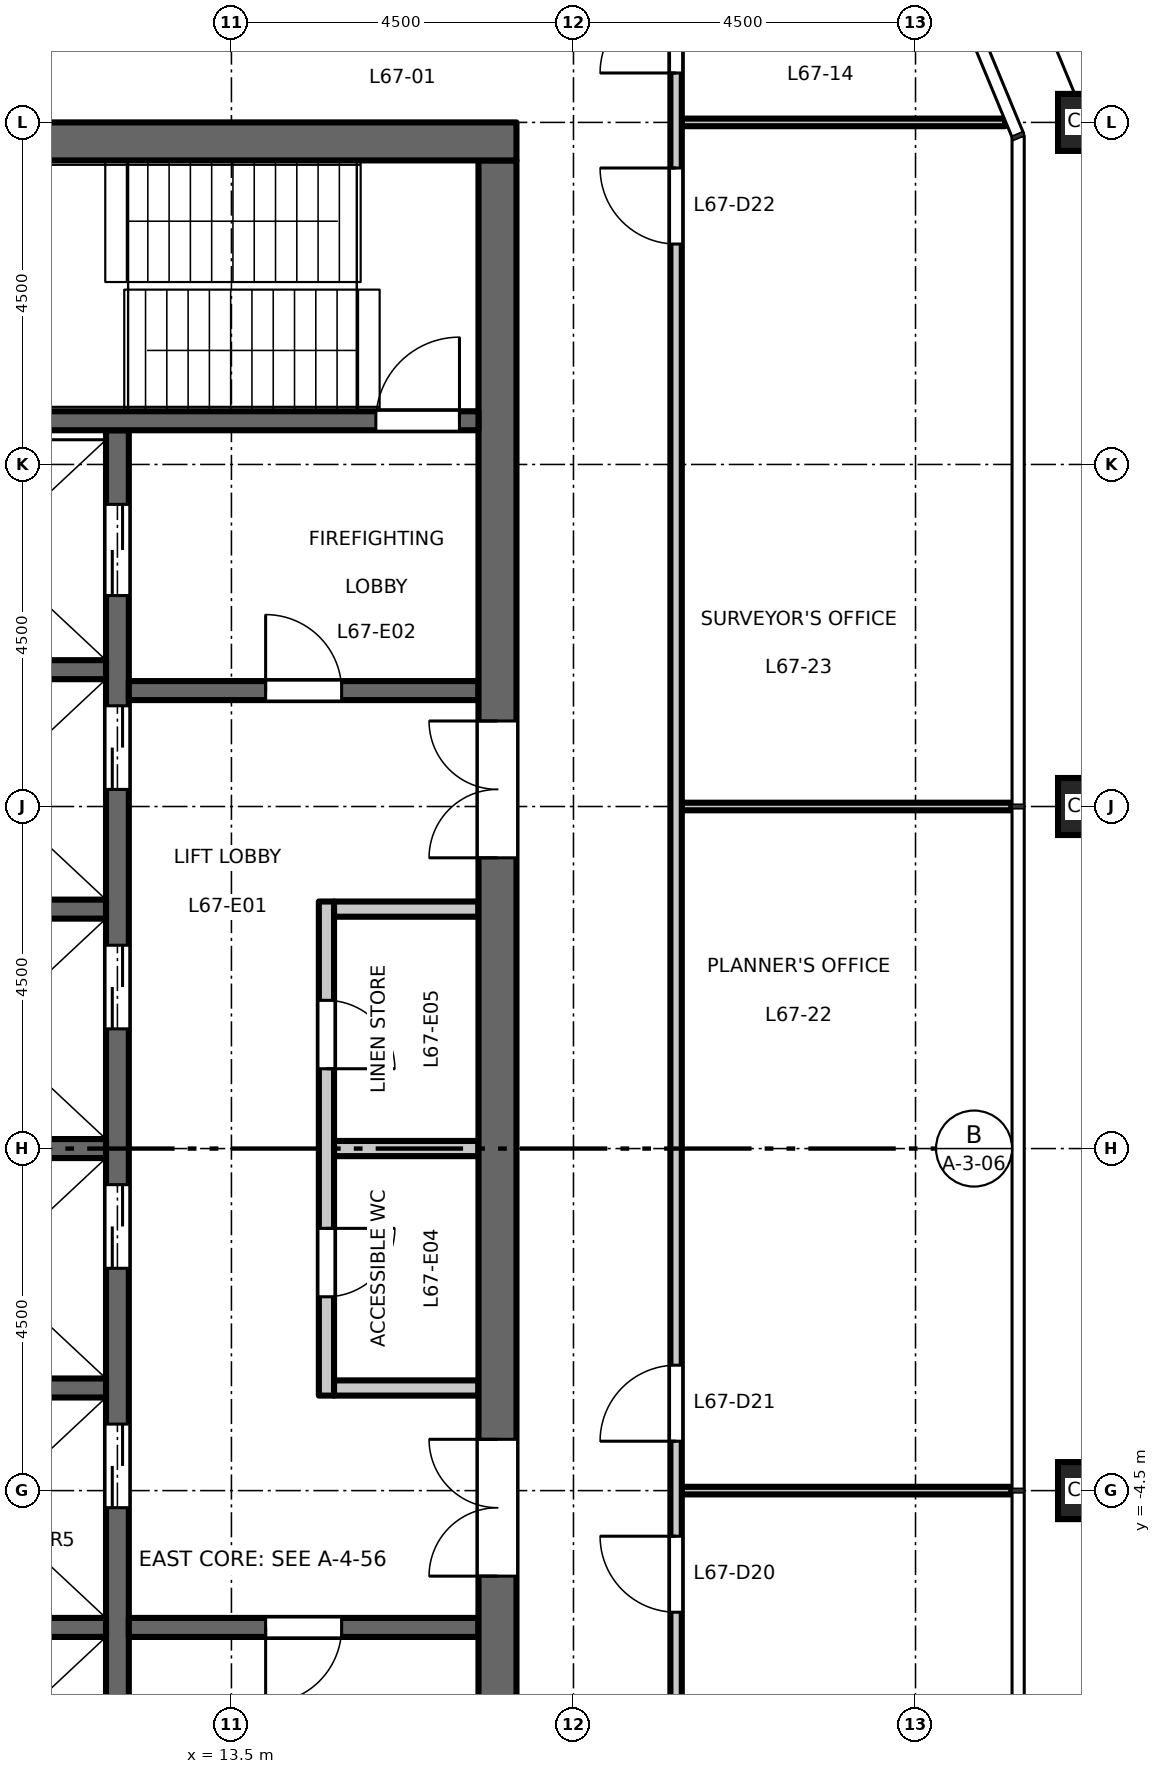
"""IFC4 building model, lengths in metres.
Left out: names, types, materials, properties, quantities, classifications, styles, units other than length and angle.
Written with IfcOpenShell. Run it as: python <this file> out.ifc"""

import sys

from ifc_helpers import new_model, si_unit, direction, frame, frame_2d, origin, origin_2d, place, context, subcontext, project, spatial, rectangle, hollow_rectangle, extrude, element, fill, save


model = new_model("IFC4")
c1 = context("Model", 3, precision=1e-05, world=origin(), true_north=direction((0.0, 1.0)))
c2 = subcontext(c1, "Body", "Model", "MODEL_VIEW")
j1 = project(units=[si_unit("LENGTHUNIT", "METRE"), si_unit("PLANEANGLEUNIT", "RADIAN")], contexts=[c1])
p1 = place(None, origin())
s1 = spatial("IfcSite", under=j1, at=p1, CompositionType="ELEMENT")
p2 = place(p1, origin())
s2 = spatial("IfcBuilding", under=s1, at=p2, CompositionType="ELEMENT")
p3 = place(p2, frame((0.0, 0.0, 312.2)))
s3 = spatial("IfcBuildingStorey", under=s2, at=p3, CompositionType="ELEMENT", Elevation=312.2)
for number, where, z_axis, x_axis in (
    (1, (24.75, -4.5, 0.0), (0.0, 0.0, 1.0), (1.0, 0.0, 0.0)),
    (2, (24.75, 4.5, 0.0), (0.0, 0.0, 1.0), (1.0, 0.0, 0.0)),
    (3, (24.75, 13.5, 0.0), (0.0, 0.0, 1.0), (1.0, 0.0, 0.0)),
):
    element("IfcColumn", number, at=place(p3, frame(where, z_axis=z_axis, x_axis=x_axis)), inside=s3, PredefinedType="COLUMN", context=c2, shape_type="SweptSolid", body=[
        extrude(hollow_rectangle(XDim=0.75, YDim=0.75, WallThickness=0.04, at=origin_2d()), origin(), (0.0, 0.0, 1.0), 4.5),
    ])
p4 = place(p3, frame((14.75, -3.25, 0.0), z_axis=(0.0, 0.0, 1.0), x_axis=(0.0, 1.0, 0.0)))
e4 = element("IfcWall", 4, at=p4, inside=s3, PredefinedType="PARTITIONING", context=c2, shape_type="SweptSolid", body=[
    extrude(rectangle(XDim=6.5, YDim=0.2, at=frame_2d((3.25, 0.0))), origin(), (0.0, 0.0, 1.0), 4.35),
])
p5 = place(p4, frame((1.3, 0.0, 0.0)))
e5 = element("IfcOpeningElement", 5, at=p5, cuts=e4, PredefinedType="OPENING", context=c2, shape_type="SweptSolid", body=[
    extrude(rectangle(XDim=0.9, YDim=2.1, at=frame_2d((0.45, 1.05))), frame((0.0, 0.11, 0.0), z_axis=(0.0, -1.0, 0.0), x_axis=(1.0, 0.0, 0.0)), (0.0, 0.0, 1.0), 0.22),
])
p6 = place(p4, frame((4.3, 0.0, 0.0)))
e6 = element("IfcOpeningElement", 6, at=p6, cuts=e4, PredefinedType="OPENING", context=c2, shape_type="SweptSolid", body=[
    extrude(rectangle(XDim=0.9, YDim=2.1, at=frame_2d((0.45, 1.05))), frame((0.0, 0.11, 0.0), z_axis=(0.0, -1.0, 0.0), x_axis=(1.0, 0.0, 0.0)), (0.0, 0.0, 1.0), 0.22),
])
for number, where, z_axis, x_axis in (
    (7, (14.85, 3.15, 0.0), (0.0, 0.0, 1.0), (1.0, 0.0, 0.0)),
    (8, (14.85, -3.15, 0.0), (0.0, 0.0, 1.0), (1.0, 0.0, 0.0)),
    (9, (14.85, 0.0, 0.0), (0.0, 0.0, 1.0), (1.0, 0.0, 0.0)),
):
    element("IfcWall", number, at=place(p3, frame(where, z_axis=z_axis, x_axis=x_axis)), inside=s3, PredefinedType="PARTITIONING", context=c2, shape_type="SweptSolid", body=[
        extrude(rectangle(XDim=1.9, YDim=0.2, at=frame_2d((0.95, 0.0))), origin(), (0.0, 0.0, 1.0), 4.35),
    ])
p7 = place(p3, frame((12.0, -9.45, 0.0), z_axis=(0.0, 0.0, 1.0), x_axis=(0.0, 1.0, 0.0)))
e10 = element("IfcWall", 10, at=p7, inside=s3, PredefinedType="SHEAR", context=c2, shape_type="SweptSolid", body=[
    extrude(rectangle(XDim=18.9, YDim=0.3, at=frame_2d((9.45, 0.0))), origin(), (0.0, 0.0, 1.0), 4.35),
])
p8 = place(p7, frame((4.725, 0.0, 0.0)))
e11 = element("IfcOpeningElement", 11, at=p8, cuts=e10, PredefinedType="OPENING", context=c2, shape_type="SweptSolid", body=[
    extrude(rectangle(XDim=1.1, YDim=2.1, at=frame_2d((0.55, 1.05))), frame((0.0, 0.16, 0.0), z_axis=(0.0, -1.0, 0.0), x_axis=(1.0, 0.0, 0.0)), (0.0, 0.0, 1.0), 0.32),
])
p9 = place(p7, frame((7.875, 0.0, 0.0)))
e12 = element("IfcOpeningElement", 12, at=p9, cuts=e10, PredefinedType="OPENING", context=c2, shape_type="SweptSolid", body=[
    extrude(rectangle(XDim=1.1, YDim=2.1, at=frame_2d((0.55, 1.05))), frame((0.0, 0.16, 0.0), z_axis=(0.0, -1.0, 0.0), x_axis=(1.0, 0.0, 0.0)), (0.0, 0.0, 1.0), 0.32),
])
p10 = place(p7, frame((11.025, 0.0, 0.0)))
e13 = element("IfcOpeningElement", 13, at=p10, cuts=e10, PredefinedType="OPENING", context=c2, shape_type="SweptSolid", body=[
    extrude(rectangle(XDim=1.1, YDim=2.1, at=frame_2d((0.55, 1.05))), frame((0.0, 0.16, 0.0), z_axis=(0.0, -1.0, 0.0), x_axis=(1.0, 0.0, 0.0)), (0.0, 0.0, 1.0), 0.32),
])
p11 = place(p7, frame((14.175, 0.0, 0.0)))
e14 = element("IfcOpeningElement", 14, at=p11, cuts=e10, PredefinedType="OPENING", context=c2, shape_type="SweptSolid", body=[
    extrude(rectangle(XDim=1.1, YDim=2.1, at=frame_2d((0.55, 1.05))), frame((0.0, 0.16, 0.0), z_axis=(0.0, -1.0, 0.0), x_axis=(1.0, 0.0, 0.0)), (0.0, 0.0, 1.0), 0.32),
])
p12 = place(p7, frame((16.725, 0.0, 0.0)))
e15 = element("IfcOpeningElement", 15, at=p12, cuts=e10, PredefinedType="OPENING", context=c2, shape_type="SweptSolid", body=[
    extrude(rectangle(XDim=1.2, YDim=2.1, at=frame_2d((0.6, 1.05))), frame((0.0, 0.16, 0.0), z_axis=(0.0, -1.0, 0.0), x_axis=(1.0, 0.0, 0.0)), (0.0, 0.0, 1.0), 0.32),
])
p13 = place(p7, frame((0.975, 0.0, 0.0)))
e16 = element("IfcOpeningElement", 16, at=p13, cuts=e10, PredefinedType="OPENING", context=c2, shape_type="SweptSolid", body=[
    extrude(rectangle(XDim=1.2, YDim=2.1, at=frame_2d((0.6, 1.05))), frame((0.0, 0.16, 0.0), z_axis=(0.0, -1.0, 0.0), x_axis=(1.0, 0.0, 0.0)), (0.0, 0.0, 1.0), 0.32),
])
p14 = place(p3, frame((12.15, 6.025, 0.0), z_axis=(0.0, 0.0, 1.0), x_axis=(1.0, 0.0, 0.0)))
e17 = element("IfcWall", 17, at=p14, inside=s3, PredefinedType="SHEAR", context=c2, shape_type="SweptSolid", body=[
    extrude(rectangle(XDim=4.6, YDim=0.25, at=frame_2d((2.3, 0.0))), origin(), (0.0, 0.0, 1.0), 4.35),
])
p15 = place(p14, frame((1.8, 0.0, 0.0)))
e18 = element("IfcOpeningElement", 18, at=p15, cuts=e17, PredefinedType="OPENING", context=c2, shape_type="SweptSolid", body=[
    extrude(rectangle(XDim=1.0, YDim=2.1, at=frame_2d((0.5, 1.05))), frame((0.0, 0.135, 0.0), z_axis=(0.0, -1.0, 0.0), x_axis=(1.0, 0.0, 0.0)), (0.0, 0.0, 1.0), 0.27),
])
p16 = place(p3, frame((12.15, -6.3, 0.0), z_axis=(0.0, 0.0, 1.0), x_axis=(1.0, 0.0, 0.0)))
e19 = element("IfcWall", 19, at=p16, inside=s3, PredefinedType="SHEAR", context=c2, shape_type="SweptSolid", body=[
    extrude(rectangle(XDim=4.6, YDim=0.25, at=frame_2d((2.3, 0.0))), origin(), (0.0, 0.0, 1.0), 4.35),
])
p17 = place(p16, frame((1.8, 0.0, 0.0)))
e20 = element("IfcOpeningElement", 20, at=p17, cuts=e19, PredefinedType="OPENING", context=c2, shape_type="SweptSolid", body=[
    extrude(rectangle(XDim=1.0, YDim=2.1, at=frame_2d((0.5, 1.05))), frame((0.0, 0.135, 0.0), z_axis=(0.0, -1.0, 0.0), x_axis=(1.0, 0.0, 0.0)), (0.0, 0.0, 1.0), 0.27),
])
p18 = place(p3, frame((17.0, -13.0, 0.0), z_axis=(0.0, 0.0, 1.0), x_axis=(0.0, 1.0, 0.0)))
e21 = element("IfcWall", 21, at=p18, inside=s3, PredefinedType="SHEAR", context=c2, shape_type="SweptSolid", body=[
    extrude(rectangle(XDim=26.0, YDim=0.5, at=frame_2d((13.0, 0.0))), origin(), (0.0, 0.0, 1.0), 4.35),
])
p19 = place(p18, frame((16.825, 0.0, 0.0)))
e22 = element("IfcOpeningElement", 22, at=p19, cuts=e21, PredefinedType="OPENING", context=c2, shape_type="SweptSolid", body=[
    extrude(rectangle(XDim=1.8, YDim=2.1, at=frame_2d((0.9, 1.05))), frame((0.0, 0.26, 0.0), z_axis=(0.0, -1.0, 0.0), x_axis=(1.0, 0.0, 0.0)), (0.0, 0.0, 1.0), 0.52),
])
p20 = place(p18, frame((7.375, 0.0, 0.0)))
e23 = element("IfcOpeningElement", 23, at=p20, cuts=e21, PredefinedType="OPENING", context=c2, shape_type="SweptSolid", body=[
    extrude(rectangle(XDim=1.8, YDim=2.1, at=frame_2d((0.9, 1.05))), frame((0.0, 0.26, 0.0), z_axis=(0.0, -1.0, 0.0), x_axis=(1.0, 0.0, 0.0)), (0.0, 0.0, 1.0), 0.52),
])
for number, where, z_axis, x_axis in (
    (24, (8.75, 0.0, 0.0), (0.0, 0.0, 1.0), (1.0, 0.0, 0.0)),
    (25, (8.75, 3.15, 0.0), (0.0, 0.0, 1.0), (1.0, 0.0, 0.0)),
    (26, (8.75, 6.3, 0.0), (0.0, 0.0, 1.0), (1.0, 0.0, 0.0)),
    (27, (8.75, -3.15, 0.0), (0.0, 0.0, 1.0), (1.0, 0.0, 0.0)),
    (28, (8.75, -6.3, 0.0), (0.0, 0.0, 1.0), (1.0, 0.0, 0.0)),
):
    element("IfcWall", number, at=place(p3, frame(where, z_axis=z_axis, x_axis=x_axis)), inside=s3, PredefinedType="SHEAR", context=c2, shape_type="SweptSolid", body=[
        extrude(rectangle(XDim=3.1, YDim=0.25, at=frame_2d((1.55, 0.0))), origin(), (0.0, 0.0, 1.0), 4.35),
    ])
p21 = place(p3, frame((8.75, 9.575, 0.0), z_axis=(0.0, 0.0, 1.0), x_axis=(1.0, 0.0, 0.0)))
e29 = element("IfcWall", 29, at=p21, inside=s3, PredefinedType="SHEAR", context=c2, shape_type="SweptSolid", body=[
    extrude(rectangle(XDim=8.0, YDim=0.25, at=frame_2d((4.0, 0.0))), origin(), (0.0, 0.0, 1.0), 4.35),
])
p22 = place(p21, frame((6.65, 0.0, 0.0)))
e30 = element("IfcOpeningElement", 30, at=p22, cuts=e29, PredefinedType="OPENING", context=c2, shape_type="SweptSolid", body=[
    extrude(rectangle(XDim=1.1, YDim=2.1, at=frame_2d((0.55, 1.05))), frame((0.0, 0.135, 0.0), z_axis=(0.0, -1.0, 0.0), x_axis=(1.0, 0.0, 0.0)), (0.0, 0.0, 1.0), 0.27),
])
p23 = place(p3, frame((8.25, 13.25, 0.0), z_axis=(0.0, 0.0, 1.0), x_axis=(1.0, 0.0, 0.0)))
e31 = element("IfcWall", 31, at=p23, inside=s3, PredefinedType="SHEAR", context=c2, shape_type="SweptSolid", body=[
    extrude(rectangle(XDim=9.0, YDim=0.5, at=frame_2d((4.5, 0.0))), origin(), (0.0, 0.0, 1.0), 4.35),
])
for number, where, z_axis, x_axis in (
    (32, (19.425, -4.5, 0.0), (0.0, 0.0, 1.0), (1.0, 0.0, 0.0)),
    (33, (19.425, 4.5, 0.0), (0.0, 0.0, 1.0), (1.0, 0.0, 0.0)),
):
    element("IfcWall", number, at=place(p3, frame(where, z_axis=z_axis, x_axis=x_axis)), inside=s3, PredefinedType="PARTITIONING", context=c2, shape_type="SweptSolid", body=[
        extrude(rectangle(XDim=4.335, YDim=0.1, at=frame_2d((2.167, 0.0))), origin(), (0.0, 0.0, 1.0), 4.35),
    ])
p24 = place(p3, frame((19.425, 13.5, 0.0), z_axis=(0.0, 0.0, 1.0), x_axis=(1.0, 0.0, 0.0)))
e34 = element("IfcWall", 34, at=p24, inside=s3, PredefinedType="PARTITIONING", context=c2, shape_type="SweptSolid", body=[
    extrude(rectangle(XDim=4.253, YDim=0.1, at=frame_2d((2.126, 0.0))), origin(), (0.0, 0.0, 1.0), 4.35),
])
p25 = place(p3, frame((19.35, -15.525, 0.0), z_axis=(0.0, 0.0, 1.0), x_axis=(0.0, 1.0, 0.0)))
e35 = element("IfcWall", 35, at=p25, inside=s3, PredefinedType="PARTITIONING", context=c2, shape_type="SweptSolid", body=[
    extrude(rectangle(XDim=31.05, YDim=0.15, at=frame_2d((15.525, 0.0))), origin(), (0.0, 0.0, 1.0), 4.35),
])
p26 = place(p25, frame((29.675, 0.0, 0.0)))
e36 = element("IfcOpeningElement", 36, at=p26, cuts=e35, PredefinedType="OPENING", context=c2, shape_type="SweptSolid", body=[
    extrude(rectangle(XDim=1.0, YDim=2.1, at=frame_2d((0.5, 1.05))), frame((0.0, 0.085, 0.0), z_axis=(0.0, -1.0, 0.0), x_axis=(1.0, 0.0, 0.0)), (0.0, 0.0, 1.0), 0.17),
])
p27 = place(p25, frame((9.425, 0.0, 0.0)))
e37 = element("IfcOpeningElement", 37, at=p27, cuts=e35, PredefinedType="OPENING", context=c2, shape_type="SweptSolid", body=[
    extrude(rectangle(XDim=1.0, YDim=2.1, at=frame_2d((0.5, 1.05))), frame((0.0, 0.085, 0.0), z_axis=(0.0, -1.0, 0.0), x_axis=(1.0, 0.0, 0.0)), (0.0, 0.0, 1.0), 0.17),
])
p28 = place(p25, frame((11.675, 0.0, 0.0)))
e38 = element("IfcOpeningElement", 38, at=p28, cuts=e35, PredefinedType="OPENING", context=c2, shape_type="SweptSolid", body=[
    extrude(rectangle(XDim=1.0, YDim=2.1, at=frame_2d((0.5, 1.05))), frame((0.0, 0.085, 0.0), z_axis=(0.0, -1.0, 0.0), x_axis=(1.0, 0.0, 0.0)), (0.0, 0.0, 1.0), 0.17),
])
p29 = place(p25, frame((27.425, 0.0, 0.0)))
e39 = element("IfcOpeningElement", 39, at=p29, cuts=e35, PredefinedType="OPENING", context=c2, shape_type="SweptSolid", body=[
    extrude(rectangle(XDim=1.0, YDim=2.1, at=frame_2d((0.5, 1.05))), frame((0.0, 0.085, 0.0), z_axis=(0.0, -1.0, 0.0), x_axis=(1.0, 0.0, 0.0)), (0.0, 0.0, 1.0), 0.17),
])
p30 = place(p15, origin())
e40 = element("IfcDoor", 40, at=p30, inside=s3, OperationType="SINGLE_SWING_RIGHT", PredefinedType="DOOR", context=c2, shape_type="SweptSolid", body=[
    extrude(rectangle(XDim=1.0, YDim=2.1, at=frame_2d((0.5, 1.05))), frame((0.0, 0.025, 0.0), z_axis=(0.0, -1.0, 0.0), x_axis=(1.0, 0.0, 0.0)), (0.0, 0.0, 1.0), 0.05),
])
fill(e18, e40)
p31 = place(p17, origin())
e41 = element("IfcDoor", 41, at=p31, inside=s3, OperationType="SINGLE_SWING_LEFT", PredefinedType="DOOR", context=c2, shape_type="SweptSolid", body=[
    extrude(rectangle(XDim=1.0, YDim=2.1, at=frame_2d((0.5, 1.05))), frame((0.0, 0.025, 0.0), z_axis=(0.0, -1.0, 0.0), x_axis=(1.0, 0.0, 0.0)), (0.0, 0.0, 1.0), 0.05),
])
fill(e20, e41)
p32 = place(p22, origin())
e42 = element("IfcDoor", 42, at=p32, inside=s3, OperationType="SINGLE_SWING_LEFT", PredefinedType="DOOR", context=c2, shape_type="SweptSolid", body=[
    extrude(rectangle(XDim=1.1, YDim=2.1, at=frame_2d((0.55, 1.05))), frame((0.0, 0.025, 0.0), z_axis=(0.0, -1.0, 0.0), x_axis=(1.0, 0.0, 0.0)), (0.0, 0.0, 1.0), 0.05),
])
fill(e30, e42)
p33 = place(p19, origin())
e43 = element("IfcDoor", 43, at=p33, inside=s3, OperationType="DOUBLE_DOOR_DOUBLE_SWING", PredefinedType="DOOR", context=c2, shape_type="SweptSolid", body=[
    extrude(rectangle(XDim=1.8, YDim=2.1, at=frame_2d((0.9, 1.05))), frame((0.0, 0.025, 0.0), z_axis=(0.0, -1.0, 0.0), x_axis=(1.0, 0.0, 0.0)), (0.0, 0.0, 1.0), 0.05),
])
fill(e22, e43)
p34 = place(p20, origin())
e44 = element("IfcDoor", 44, at=p34, inside=s3, OperationType="DOUBLE_DOOR_DOUBLE_SWING", PredefinedType="DOOR", context=c2, shape_type="SweptSolid", body=[
    extrude(rectangle(XDim=1.8, YDim=2.1, at=frame_2d((0.9, 1.05))), frame((0.0, 0.025, 0.0), z_axis=(0.0, -1.0, 0.0), x_axis=(1.0, 0.0, 0.0)), (0.0, 0.0, 1.0), 0.05),
])
fill(e23, e44)
p35 = place(p8, origin())
e45 = element("IfcDoor", 45, at=p35, inside=s3, OperationType="DOUBLE_DOOR_SLIDING", PredefinedType="DOOR", context=c2, shape_type="SweptSolid", body=[
    extrude(rectangle(XDim=1.1, YDim=2.1, at=frame_2d((0.55, 1.05))), frame((0.0, 0.025, 0.0), z_axis=(0.0, -1.0, 0.0), x_axis=(1.0, 0.0, 0.0)), (0.0, 0.0, 1.0), 0.05),
])
fill(e11, e45)
p36 = place(p9, origin())
e46 = element("IfcDoor", 46, at=p36, inside=s3, OperationType="DOUBLE_DOOR_SLIDING", PredefinedType="DOOR", context=c2, shape_type="SweptSolid", body=[
    extrude(rectangle(XDim=1.1, YDim=2.1, at=frame_2d((0.55, 1.05))), frame((0.0, 0.025, 0.0), z_axis=(0.0, -1.0, 0.0), x_axis=(1.0, 0.0, 0.0)), (0.0, 0.0, 1.0), 0.05),
])
fill(e12, e46)
p37 = place(p10, origin())
e47 = element("IfcDoor", 47, at=p37, inside=s3, OperationType="DOUBLE_DOOR_SLIDING", PredefinedType="DOOR", context=c2, shape_type="SweptSolid", body=[
    extrude(rectangle(XDim=1.1, YDim=2.1, at=frame_2d((0.55, 1.05))), frame((0.0, 0.025, 0.0), z_axis=(0.0, -1.0, 0.0), x_axis=(1.0, 0.0, 0.0)), (0.0, 0.0, 1.0), 0.05),
])
fill(e13, e47)
p38 = place(p11, origin())
e48 = element("IfcDoor", 48, at=p38, inside=s3, OperationType="DOUBLE_DOOR_SLIDING", PredefinedType="DOOR", context=c2, shape_type="SweptSolid", body=[
    extrude(rectangle(XDim=1.1, YDim=2.1, at=frame_2d((0.55, 1.05))), frame((0.0, 0.025, 0.0), z_axis=(0.0, -1.0, 0.0), x_axis=(1.0, 0.0, 0.0)), (0.0, 0.0, 1.0), 0.05),
])
fill(e14, e48)
p39 = place(p12, origin())
e49 = element("IfcDoor", 49, at=p39, inside=s3, OperationType="DOUBLE_DOOR_SLIDING", PredefinedType="DOOR", context=c2, shape_type="SweptSolid", body=[
    extrude(rectangle(XDim=1.2, YDim=2.1, at=frame_2d((0.6, 1.05))), frame((0.0, 0.025, 0.0), z_axis=(0.0, -1.0, 0.0), x_axis=(1.0, 0.0, 0.0)), (0.0, 0.0, 1.0), 0.05),
])
fill(e15, e49)
p40 = place(p5, origin())
e50 = element("IfcDoor", 50, at=p40, inside=s3, OperationType="SINGLE_SWING_RIGHT", PredefinedType="DOOR", context=c2, shape_type="SweptSolid", body=[
    extrude(rectangle(XDim=0.9, YDim=2.1, at=frame_2d((0.45, 1.05))), frame((0.0, 0.025, 0.0), z_axis=(0.0, -1.0, 0.0), x_axis=(1.0, 0.0, 0.0)), (0.0, 0.0, 1.0), 0.05),
])
fill(e5, e50)
p41 = place(p6, origin())
e51 = element("IfcDoor", 51, at=p41, inside=s3, OperationType="SINGLE_SWING_LEFT", PredefinedType="DOOR", context=c2, shape_type="SweptSolid", body=[
    extrude(rectangle(XDim=0.9, YDim=2.1, at=frame_2d((0.45, 1.05))), frame((0.0, 0.025, 0.0), z_axis=(0.0, -1.0, 0.0), x_axis=(1.0, 0.0, 0.0)), (0.0, 0.0, 1.0), 0.05),
])
fill(e6, e51)
p42 = place(p26, origin())
e52 = element("IfcDoor", 52, at=p42, inside=s3, OperationType="SINGLE_SWING_LEFT", PredefinedType="DOOR", context=c2, shape_type="SweptSolid", body=[
    extrude(rectangle(XDim=1.0, YDim=2.1, at=frame_2d((0.5, 1.05))), frame((0.0, 0.025, 0.0), z_axis=(0.0, -1.0, 0.0), x_axis=(1.0, 0.0, 0.0)), (0.0, 0.0, 1.0), 0.05),
])
fill(e36, e52)
p43 = place(p27, origin())
e53 = element("IfcDoor", 53, at=p43, inside=s3, OperationType="SINGLE_SWING_RIGHT", PredefinedType="DOOR", context=c2, shape_type="SweptSolid", body=[
    extrude(rectangle(XDim=1.0, YDim=2.1, at=frame_2d((0.5, 1.05))), frame((0.0, 0.025, 0.0), z_axis=(0.0, -1.0, 0.0), x_axis=(1.0, 0.0, 0.0)), (0.0, 0.0, 1.0), 0.05),
])
fill(e37, e53)
p44 = place(p28, origin())
e54 = element("IfcDoor", 54, at=p44, inside=s3, OperationType="SINGLE_SWING_LEFT", PredefinedType="DOOR", context=c2, shape_type="SweptSolid", body=[
    extrude(rectangle(XDim=1.0, YDim=2.1, at=frame_2d((0.5, 1.05))), frame((0.0, 0.025, 0.0), z_axis=(0.0, -1.0, 0.0), x_axis=(1.0, 0.0, 0.0)), (0.0, 0.0, 1.0), 0.05),
])
fill(e38, e54)
p45 = place(p29, origin())
e55 = element("IfcDoor", 55, at=p45, inside=s3, OperationType="SINGLE_SWING_RIGHT", PredefinedType="DOOR", context=c2, shape_type="SweptSolid", body=[
    extrude(rectangle(XDim=1.0, YDim=2.1, at=frame_2d((0.5, 1.05))), frame((0.0, 0.025, 0.0), z_axis=(0.0, -1.0, 0.0), x_axis=(1.0, 0.0, 0.0)), (0.0, 0.0, 1.0), 0.05),
])
fill(e39, e55)
save(model, sys.argv[1])
